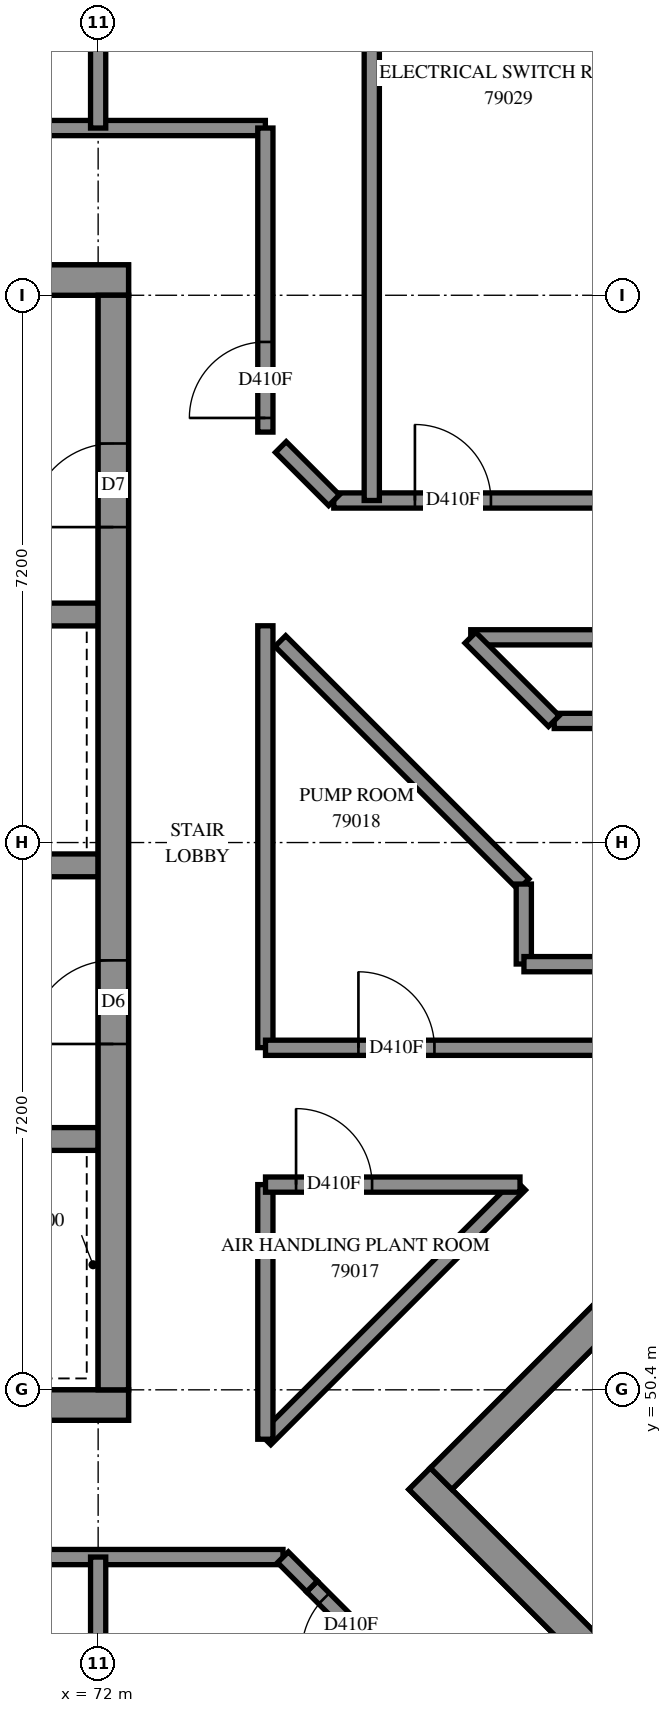
"""IFC4 building model, lengths in metres.
Left out: names, types, materials, properties, quantities, classifications, styles, units other than length and angle.
Written with IfcOpenShell. Run it as: python <this file> out.ifc"""

import sys

from ifc_helpers import new_model, si_unit, direction, frame, frame_2d, origin, place, context, subcontext, project, spatial, polyline, rectangle, outline, extrude, element, fill, save


model = new_model("IFC4")
c1 = context("Model", 3, precision=1e-05, world=origin(), true_north=direction((0.0, 1.0)))
c2 = subcontext(c1, "Body", "Model", "MODEL_VIEW")
j1 = project(units=[si_unit("LENGTHUNIT", "METRE"), si_unit("PLANEANGLEUNIT", "RADIAN")], contexts=[c1])
p1 = place(None, origin())
s1 = spatial("IfcSite", under=j1, at=p1, CompositionType="ELEMENT")
p2 = place(p1, origin())
s2 = spatial("IfcBuilding", under=s1, at=p2, CompositionType="ELEMENT")
p3 = place(p2, frame((0.0, 0.0, 290.6)))
s3 = spatial("IfcBuildingStorey", under=s2, at=p3, CompositionType="ELEMENT", Elevation=290.6)
p4 = place(p3, frame((57.2, 50.2, -0.3), z_axis=(0.0, 0.0, 1.0), x_axis=(1.0, 0.0, 0.0)))
e1 = element("IfcWall", 1, at=p4, inside=s3, PredefinedType="SHEAR", context=c2, shape_type="SweptSolid", body=[
    extrude(rectangle(XDim=15.2, YDim=0.4, at=frame_2d((7.6, 0.0))), origin(), (0.0, 0.0, 1.0), 3.1),
])
p5 = place(p3, frame((57.2, 65.0, -0.3), z_axis=(0.0, 0.0, 1.0), x_axis=(1.0, 0.0, 0.0)))
e2 = element("IfcWall", 2, at=p5, inside=s3, PredefinedType="SHEAR", context=c2, shape_type="SweptSolid", body=[
    extrude(rectangle(XDim=15.2, YDim=0.4, at=frame_2d((7.6, 0.0))), origin(), (0.0, 0.0, 1.0), 3.1),
])
p6 = place(p5, frame((10.4, 0.0, 0.3)))
e3 = element("IfcOpeningElement", 3, at=p6, cuts=e2, PredefinedType="OPENING", context=c2, shape_type="SweptSolid", body=[
    extrude(rectangle(XDim=0.8, YDim=2.1, at=frame_2d((0.4, 1.05))), frame((0.0, 0.21, 0.0), z_axis=(0.0, -1.0, 0.0), x_axis=(1.0, 0.0, 0.0)), (0.0, 0.0, 1.0), 0.42),
])
p7 = place(p3, frame((72.2, 50.4, -0.3), z_axis=(0.0, 0.0, 1.0), x_axis=(0.0, 1.0, 0.0)))
e4 = element("IfcWall", 4, at=p7, inside=s3, PredefinedType="SHEAR", context=c2, shape_type="SweptSolid", body=[
    extrude(rectangle(XDim=14.4, YDim=0.4, at=frame_2d((7.2, 0.0))), origin(), (0.0, 0.0, 1.0), 3.1),
])
p8 = place(p7, frame((4.55, 0.0, 0.3)))
e5 = element("IfcOpeningElement", 5, at=p8, cuts=e4, PredefinedType="OPENING", context=c2, shape_type="SweptSolid", body=[
    extrude(rectangle(XDim=1.1, YDim=2.1, at=frame_2d((0.55, 1.05))), frame((0.0, 0.21, 0.0), z_axis=(0.0, -1.0, 0.0), x_axis=(1.0, 0.0, 0.0)), (0.0, 0.0, 1.0), 0.42),
])
p9 = place(p7, frame((11.35, 0.0, 0.3)))
e6 = element("IfcOpeningElement", 6, at=p9, cuts=e4, PredefinedType="OPENING", context=c2, shape_type="SweptSolid", body=[
    extrude(rectangle(XDim=1.1, YDim=2.1, at=frame_2d((0.55, 1.05))), frame((0.0, 0.21, 0.0), z_axis=(0.0, -1.0, 0.0), x_axis=(1.0, 0.0, 0.0)), (0.0, 0.0, 1.0), 0.42),
])
p10 = place(p3, frame((57.6, 53.7, 0.0), z_axis=(0.0, 0.0, 1.0), x_axis=(1.0, 0.0, 0.0)))
e7 = element("IfcWall", 7, at=p10, inside=s3, PredefinedType="SOLIDWALL", context=c2, shape_type="SweptSolid", body=[
    extrude(rectangle(XDim=14.4, YDim=0.3, at=frame_2d((7.2, 0.0))), origin(), (0.0, 0.0, 1.0), 3.5),
])
p11 = place(p10, frame((12.05, 0.0, 0.0)))
e8 = element("IfcOpeningElement", 8, at=p11, cuts=e7, PredefinedType="OPENING", context=c2, shape_type="SweptSolid", body=[
    extrude(rectangle(XDim=1.1, YDim=2.1, at=frame_2d((0.55, 1.05))), frame((0.0, 0.16, 0.0), z_axis=(0.0, -1.0, 0.0), x_axis=(1.0, 0.0, 0.0)), (0.0, 0.0, 1.0), 0.32),
])
p12 = place(p3, frame((57.6, 57.3, 0.0), z_axis=(0.0, 0.0, 1.0), x_axis=(1.0, 0.0, 0.0)))
e9 = element("IfcWall", 9, at=p12, inside=s3, PredefinedType="SOLIDWALL", context=c2, shape_type="SweptSolid", body=[
    extrude(rectangle(XDim=14.4, YDim=0.3, at=frame_2d((7.2, 0.0))), origin(), (0.0, 0.0, 1.0), 3.5),
])
p13 = place(p12, frame((12.05, 0.0, 0.0)))
e10 = element("IfcOpeningElement", 10, at=p13, cuts=e9, PredefinedType="OPENING", context=c2, shape_type="SweptSolid", body=[
    extrude(rectangle(XDim=1.1, YDim=2.1, at=frame_2d((0.55, 1.05))), frame((0.0, 0.16, 0.0), z_axis=(0.0, -1.0, 0.0), x_axis=(1.0, 0.0, 0.0)), (0.0, 0.0, 1.0), 0.32),
])
p14 = place(p3, frame((64.8, 60.6, 0.0), z_axis=(0.0, 0.0, 1.0), x_axis=(1.0, 0.0, 0.0)))
e11 = element("IfcWall", 11, at=p14, inside=s3, PredefinedType="SOLIDWALL", context=c2, shape_type="SweptSolid", body=[
    extrude(rectangle(XDim=7.2, YDim=0.3, at=frame_2d((3.6, 0.0))), origin(), (0.0, 0.0, 1.0), 3.5),
])
p15 = place(p3, frame((76.23, 49.231, -0.3), z_axis=(0.0, 0.0, 1.0), x_axis=(0.7071034917, -0.7071100706, 0.0)))
e12 = element("IfcWall", 12, at=p15, inside=s3, PredefinedType="SHEAR", context=c2, shape_type="SweptSolid", body=[
    extrude(rectangle(XDim=15.2, YDim=0.4, at=frame_2d((7.6, 0.0))), origin(), (0.0, 0.0, 1.0), 3.1),
])
p16 = place(p3, frame((76.513, 49.231, -0.3), z_axis=(0.0, 0.0, 1.0), x_axis=(0.7071067812, 0.7071067812, 0.0)))
e13 = element("IfcWall", 13, at=p16, inside=s3, PredefinedType="SHEAR", context=c2, shape_type="SweptSolid", body=[
    extrude(rectangle(XDim=14.4, YDim=0.4, at=frame_2d((7.2, 0.0))), origin(), (0.0, 0.0, 1.0), 3.1),
])
p17 = place(p16, frame((4.55, 0.0, 0.3)))
e14 = element("IfcOpeningElement", 14, at=p17, cuts=e13, PredefinedType="OPENING", context=c2, shape_type="SweptSolid", body=[
    extrude(rectangle(XDim=1.1, YDim=2.1, at=frame_2d((0.55, 1.05))), frame((0.0, 0.21, 0.0), z_axis=(0.0, -1.0, 0.0), x_axis=(1.0, 0.0, 0.0)), (0.0, 0.0, 1.0), 0.42),
])
p18 = place(p16, frame((11.35, 0.0, 0.3)))
e15 = element("IfcOpeningElement", 15, at=p18, cuts=e13, PredefinedType="OPENING", context=c2, shape_type="SweptSolid", body=[
    extrude(rectangle(XDim=1.1, YDim=2.1, at=frame_2d((0.55, 1.05))), frame((0.0, 0.21, 0.0), z_axis=(0.0, -1.0, 0.0), x_axis=(1.0, 0.0, 0.0)), (0.0, 0.0, 1.0), 0.42),
])
p19 = place(p3, frame((55.4, 67.0, 0.0), z_axis=(0.0, 0.0, 1.0), x_axis=(1.0, 0.0, 0.0)))
e16 = element("IfcWall", 16, at=p19, inside=s3, PredefinedType="PARTITIONING", context=c2, shape_type="SweptSolid", body=[
    extrude(rectangle(XDim=18.8, YDim=0.2, at=frame_2d((9.4, 0.0))), origin(), (0.0, 0.0, 1.0), 3.5),
])
p20 = place(p19, frame((4.293, 0.0, 0.0)))
e17 = element("IfcOpeningElement", 17, at=p20, cuts=e16, PredefinedType="OPENING", context=c2, shape_type="SweptSolid", body=[
    extrude(rectangle(XDim=1.0, YDim=2.1, at=frame_2d((0.5, 1.05))), frame((0.0, 0.11, 0.0), z_axis=(0.0, -1.0, 0.0), x_axis=(1.0, 0.0, 0.0)), (0.0, 0.0, 1.0), 0.22),
])
p21 = place(p19, frame((6.367, 0.0, 0.0)))
e18 = element("IfcOpeningElement", 18, at=p21, cuts=e16, PredefinedType="OPENING", context=c2, shape_type="SweptSolid", body=[
    extrude(rectangle(XDim=1.0, YDim=2.1, at=frame_2d((0.5, 1.05))), frame((0.0, 0.11, 0.0), z_axis=(0.0, -1.0, 0.0), x_axis=(1.0, 0.0, 0.0)), (0.0, 0.0, 1.0), 0.22),
])
p22 = place(p19, frame((11.492, 0.0, 0.0)))
e19 = element("IfcOpeningElement", 19, at=p22, cuts=e16, PredefinedType="OPENING", context=c2, shape_type="SweptSolid", body=[
    extrude(rectangle(XDim=1.0, YDim=2.1, at=frame_2d((0.5, 1.05))), frame((0.0, 0.11, 0.0), z_axis=(0.0, -1.0, 0.0), x_axis=(1.0, 0.0, 0.0)), (0.0, 0.0, 1.0), 0.22),
])
p23 = place(p19, frame((13.568, 0.0, 0.0)))
e20 = element("IfcOpeningElement", 20, at=p23, cuts=e16, PredefinedType="OPENING", context=c2, shape_type="SweptSolid", body=[
    extrude(rectangle(XDim=1.0, YDim=2.1, at=frame_2d((0.5, 1.05))), frame((0.0, 0.11, 0.0), z_axis=(0.0, -1.0, 0.0), x_axis=(1.0, 0.0, 0.0)), (0.0, 0.0, 1.0), 0.22),
])
p24 = place(p3, frame((56.8, 48.2, 0.0), z_axis=(0.0, 0.0, 1.0), x_axis=(1.0, 0.0, 0.0)))
e21 = element("IfcWall", 21, at=p24, inside=s3, PredefinedType="PARTITIONING", context=c2, shape_type="SweptSolid", body=[
    extrude(rectangle(XDim=17.632, YDim=0.2, at=frame_2d((8.816, 0.0))), origin(), (0.0, 0.0, 1.0), 3.5),
])
p25 = place(p24, frame((4.081, 0.0, 0.0)))
e22 = element("IfcOpeningElement", 22, at=p25, cuts=e21, PredefinedType="OPENING", context=c2, shape_type="SweptSolid", body=[
    extrude(rectangle(XDim=1.0, YDim=2.1, at=frame_2d((0.5, 1.05))), frame((0.0, 0.11, 0.0), z_axis=(0.0, -1.0, 0.0), x_axis=(1.0, 0.0, 0.0)), (0.0, 0.0, 1.0), 0.22),
])
p26 = place(p24, frame((11.886, 0.0, 0.0)))
e23 = element("IfcOpeningElement", 23, at=p26, cuts=e21, PredefinedType="OPENING", context=c2, shape_type="SweptSolid", body=[
    extrude(rectangle(XDim=1.0, YDim=2.1, at=frame_2d((0.5, 1.05))), frame((0.0, 0.11, 0.0), z_axis=(0.0, -1.0, 0.0), x_axis=(1.0, 0.0, 0.0)), (0.0, 0.0, 1.0), 0.22),
])
p27 = place(p3, frame((74.2, 54.902, 0.0), z_axis=(0.0, 0.0, 1.0), x_axis=(0.0, 1.0, 0.0)))
e24 = element("IfcWall", 24, at=p27, inside=s3, PredefinedType="PARTITIONING", context=c2, shape_type="SweptSolid", body=[
    extrude(rectangle(XDim=5.55, YDim=0.2, at=frame_2d((2.775, 0.0))), origin(), (0.0, 0.0, 1.0), 3.5),
])
p28 = place(p3, frame((74.202, 54.9, 0.0), z_axis=(0.0, 0.0, 1.0), x_axis=(1.0, 0.0, 0.0)))
e25 = element("IfcWall", 25, at=p28, inside=s3, PredefinedType="PARTITIONING", context=c2, shape_type="SweptSolid", body=[
    extrude(rectangle(XDim=5.55, YDim=0.2, at=frame_2d((2.775, 0.0))), origin(), (0.0, 0.0, 1.0), 3.5),
])
p29 = place(p28, frame((1.222, 0.0, 0.0)))
e26 = element("IfcOpeningElement", 26, at=p29, cuts=e25, PredefinedType="OPENING", context=c2, shape_type="SweptSolid", body=[
    extrude(rectangle(XDim=1.0, YDim=2.1, at=frame_2d((0.5, 1.05))), frame((0.0, 0.11, 0.0), z_axis=(0.0, -1.0, 0.0), x_axis=(1.0, 0.0, 0.0)), (0.0, 0.0, 1.0), 0.22),
])
p30 = place(p3, frame((74.201, 49.749, 0.0), z_axis=(0.0, 0.0, 1.0), x_axis=(0.7071067812, 0.7071067812, 0.0)))
e27 = element("IfcWall", 27, at=p30, inside=s3, PredefinedType="PARTITIONING", context=c2, shape_type="SweptSolid", body=[
    extrude(rectangle(XDim=4.738, YDim=0.2, at=frame_2d((2.369, 0.0))), origin(), (0.0, 0.0, 1.0), 3.5),
])
p31 = place(p3, frame((72.0, 42.85, 0.0), z_axis=(0.0, 0.0, 1.0), x_axis=(0.0, 1.0, 0.0)))
e28 = element("IfcWall", 28, at=p31, inside=s3, PredefinedType="PARTITIONING", context=c2, shape_type="SweptSolid", body=[
    extrude(rectangle(XDim=5.35, YDim=0.2, at=frame_2d((2.675, 0.0))), origin(), (0.0, 0.0, 1.0), 3.0),
])
p32 = place(p3, frame((72.0, 67.0, 0.0), z_axis=(0.0, 0.0, 1.0), x_axis=(0.0, 1.0, 0.0)))
e29 = element("IfcWall", 29, at=p32, inside=s3, PredefinedType="PARTITIONING", context=c2, shape_type="SweptSolid", body=[
    extrude(rectangle(XDim=5.35, YDim=0.2, at=frame_2d((2.675, 0.0))), origin(), (0.0, 0.0, 1.0), 3.5),
])
p33 = place(p3, frame((74.397, 60.251, 0.0), z_axis=(0.0, 0.0, 1.0), x_axis=(0.7071067812, -0.7071067812, 0.0)))
e30 = element("IfcWall", 30, at=p33, inside=s3, PredefinedType="PARTITIONING", context=c2, shape_type="SweptSolid", body=[
    extrude(rectangle(XDim=4.526, YDim=0.2, at=frame_2d((2.263, 0.0))), origin(), (0.0, 0.0, 1.0), 3.5),
])
p34 = place(p3, frame((77.829, 44.799, 0.0), z_axis=(0.0, 0.0, 1.0), x_axis=(-0.7072005868, 0.7070129631, 0.0)))
e31 = element("IfcWall", 31, at=p34, inside=s3, PredefinedType="PARTITIONING", context=c2, shape_type="SweptSolid", body=[
    extrude(rectangle(XDim=4.264, YDim=0.2, at=frame_2d((2.132, 0.0))), origin(), (0.0, 0.0, 1.0), 3.5),
])
p35 = place(p34, frame((3.04, 0.0, 0.0)))
e32 = element("IfcOpeningElement", 32, at=p35, cuts=e31, PredefinedType="OPENING", context=c2, shape_type="SweptSolid", body=[
    extrude(rectangle(XDim=1.0, YDim=2.1, at=frame_2d((0.5, 1.05))), frame((0.0, 0.11, 0.0), z_axis=(0.0, -1.0, 0.0), x_axis=(1.0, 0.0, 0.0)), (0.0, 0.0, 1.0), 0.22),
])
p36 = place(p3, frame((75.1, 62.1, 0.0), z_axis=(0.0, 0.0, 1.0), x_axis=(1.0, 0.0, 0.0)))
e33 = element("IfcWall", 33, at=p36, inside=s3, PredefinedType="PARTITIONING", context=c2, shape_type="SweptSolid", body=[
    extrude(rectangle(XDim=4.1, YDim=0.2, at=frame_2d((2.05, 0.0))), origin(), (0.0, 0.0, 1.0), 3.5),
])
p37 = place(p36, frame((1.067, 0.0, 0.0)))
e34 = element("IfcOpeningElement", 34, at=p37, cuts=e33, PredefinedType="OPENING", context=c2, shape_type="SweptSolid", body=[
    extrude(rectangle(XDim=1.0, YDim=2.1, at=frame_2d((0.5, 1.05))), frame((0.0, 0.11, 0.0), z_axis=(0.0, -1.0, 0.0), x_axis=(1.0, 0.0, 0.0)), (0.0, 0.0, 1.0), 0.22),
])
p38 = place(p3, frame((74.2, 63.0, 0.0), z_axis=(0.0, 0.0, 1.0), x_axis=(0.0, 1.0, 0.0)))
e35 = element("IfcWall", 35, at=p38, inside=s3, PredefinedType="PARTITIONING", context=c2, shape_type="SweptSolid", body=[
    extrude(rectangle(XDim=4.0, YDim=0.2, at=frame_2d((2.0, 0.0))), origin(), (0.0, 0.0, 1.0), 3.5),
])
p39 = place(p38, frame((0.186, 0.0, 0.0)))
e36 = element("IfcOpeningElement", 36, at=p39, cuts=e35, PredefinedType="OPENING", context=c2, shape_type="SweptSolid", body=[
    extrude(rectangle(XDim=1.0, YDim=2.1, at=frame_2d((0.5, 1.05))), frame((0.0, 0.11, 0.0), z_axis=(0.0, -1.0, 0.0), x_axis=(1.0, 0.0, 0.0)), (0.0, 0.0, 1.0), 0.22),
])
p40 = place(p3, frame((74.2, 49.75, 0.0), z_axis=(0.0, 0.0, 1.0), x_axis=(0.0, 1.0, 0.0)))
e37 = element("IfcWall", 37, at=p40, inside=s3, PredefinedType="PARTITIONING", context=c2, shape_type="SweptSolid", body=[
    extrude(rectangle(XDim=3.35, YDim=0.2, at=frame_2d((1.675, 0.0))), origin(), (0.0, 0.0, 1.0), 3.5),
])
p41 = place(p3, frame((74.202, 53.1, 0.0), z_axis=(0.0, 0.0, 1.0), x_axis=(1.0, 0.0, 0.0)))
e38 = element("IfcWall", 38, at=p41, inside=s3, PredefinedType="PARTITIONING", context=c2, shape_type="SweptSolid", body=[
    extrude(rectangle(XDim=3.348, YDim=0.2, at=frame_2d((1.674, 0.0))), origin(), (0.0, 0.0, 1.0), 3.5),
])
p42 = place(p41, frame((0.402, 0.0, 0.0)))
e39 = element("IfcOpeningElement", 39, at=p42, cuts=e38, PredefinedType="OPENING", context=c2, shape_type="SweptSolid", body=[
    extrude(rectangle(XDim=1.0, YDim=2.1, at=frame_2d((0.5, 1.05))), frame((0.0, 0.11, 0.0), z_axis=(0.0, -1.0, 0.0), x_axis=(1.0, 0.0, 0.0)), (0.0, 0.0, 1.0), 0.22),
])
p43 = place(p3, frame((76.902, 60.3, 0.0), z_axis=(0.0, 0.0, 1.0), x_axis=(1.0, 0.0, 0.0)))
e40 = element("IfcWall", 40, at=p43, inside=s3, PredefinedType="PARTITIONING", context=c2, shape_type="SweptSolid", body=[
    extrude(rectangle(XDim=2.298, YDim=0.2, at=frame_2d((1.149, 0.0))), origin(), (0.0, 0.0, 1.0), 3.5),
])
p44 = place(p3, frame((78.0, 59.2, 0.0), z_axis=(0.0, 0.0, 1.0), x_axis=(1.0, 0.0, 0.0)))
e41 = element("IfcWall", 41, at=p44, inside=s3, PredefinedType="PARTITIONING", context=c2, shape_type="SweptSolid", body=[
    extrude(rectangle(XDim=1.8, YDim=0.2, at=frame_2d((0.9, 0.0))), origin(), (0.0, 0.0, 1.0), 3.5),
])
p45 = place(p3, frame((76.897, 60.295, 0.0), z_axis=(0.0, 0.0, 1.0), x_axis=(0.7071067812, -0.7071067812, 0.0)))
e42 = element("IfcWall", 42, at=p45, inside=s3, PredefinedType="PARTITIONING", context=c2, shape_type="SweptSolid", body=[
    extrude(rectangle(XDim=1.553, YDim=0.2, at=frame_2d((0.776, 0.0))), origin(), (0.0, 0.0, 1.0), 3.5),
])
for number, where, z_axis, x_axis in (
    (43, (77.6, 56.002, 0.0), (0.0, 0.0, 1.0), (0.0, 1.0, 0.0)),
    (44, (77.602, 56.0, 0.0), (0.0, 0.0, 1.0), (1.0, 0.0, 0.0)),
):
    element("IfcWall", number, at=place(p3, frame(where, z_axis=z_axis, x_axis=x_axis)), inside=s3, PredefinedType="PARTITIONING", context=c2, shape_type="SweptSolid", body=[
        extrude(rectangle(XDim=1.052, YDim=0.2, at=frame_2d((0.526, 0.0))), origin(), (0.0, 0.0, 1.0), 3.5),
    ])
p46 = place(p3, frame((74.403, 62.803, 0.0), z_axis=(0.0, 0.0, 1.0), x_axis=(0.7071067812, -0.7071067812, 0.0)))
e45 = element("IfcWall", 45, at=p46, inside=s3, PredefinedType="PARTITIONING", context=c2, shape_type="SweptSolid", body=[
    extrude(rectangle(XDim=0.99, YDim=0.2, at=frame_2d((0.495, 0.0))), origin(), (0.0, 0.0, 1.0), 3.5),
])
p47 = place(p3, frame((74.431, 48.198, 0.0), z_axis=(0.0, 0.0, 1.0), x_axis=(0.7052581455, -0.7089505965, 0.0)))
e46 = element("IfcWall", 46, at=p47, inside=s3, PredefinedType="PARTITIONING", context=c2, shape_type="SweptSolid", body=[
    extrude(rectangle(XDim=0.542, YDim=0.2, at=frame_2d((0.271, 0.0))), origin(), (0.0, 0.0, 1.0), 3.5),
])
p48 = place(p3, frame((75.6, 62.1, 0.0), z_axis=(0.0, 0.0, 1.0), x_axis=(0.0, 1.0, 0.0)))
e47 = element("IfcWall", 47, at=p48, inside=s3, PredefinedType="PARTITIONING", context=c2, shape_type="SweptSolid", body=[
    extrude(outline(polyline([(0.0, -0.1), (10.7, -0.1), (10.7, 0.1), (0.0, 0.1), (0.0, -0.1)])), origin(), (0.0, 0.0, 1.0), 3.5),
])
p49 = place(p8, origin())
e48 = element("IfcDoor", 48, at=p49, inside=s3, OperationType="DOUBLE_DOOR_SINGLE_SWING", PredefinedType="DOOR", context=c2, shape_type="SweptSolid", body=[
    extrude(rectangle(XDim=1.1, YDim=2.1, at=frame_2d((0.55, 1.05))), frame((0.0, 0.025, 0.0), z_axis=(0.0, -1.0, 0.0), x_axis=(1.0, 0.0, 0.0)), (0.0, 0.0, 1.0), 0.05),
])
fill(e5, e48)
p50 = place(p9, origin())
e49 = element("IfcDoor", 49, at=p50, inside=s3, OperationType="SINGLE_SWING_RIGHT", PredefinedType="DOOR", context=c2, shape_type="SweptSolid", body=[
    extrude(rectangle(XDim=1.1, YDim=2.1, at=frame_2d((0.55, 1.05))), frame((0.0, 0.025, 0.0), z_axis=(0.0, -1.0, 0.0), x_axis=(1.0, 0.0, 0.0)), (0.0, 0.0, 1.0), 0.05),
])
fill(e6, e49)
p51 = place(p35, origin())
e50 = element("IfcDoor", 50, at=p51, inside=s3, OperationType="SINGLE_SWING_LEFT", PredefinedType="DOOR", context=c2, shape_type="SweptSolid", body=[
    extrude(rectangle(XDim=1.0, YDim=2.1, at=frame_2d((0.5, 1.05))), frame((0.0, 0.025, 0.0), z_axis=(0.0, -1.0, 0.0), x_axis=(1.0, 0.0, 0.0)), (0.0, 0.0, 1.0), 0.05),
])
fill(e32, e50)
p52 = place(p42, origin())
e51 = element("IfcDoor", 51, at=p52, inside=s3, OperationType="SINGLE_SWING_RIGHT", PredefinedType="DOOR", context=c2, shape_type="SweptSolid", body=[
    extrude(rectangle(XDim=1.0, YDim=2.1, at=frame_2d((0.5, 1.05))), frame((0.0, 0.025, 0.0), z_axis=(0.0, -1.0, 0.0), x_axis=(1.0, 0.0, 0.0)), (0.0, 0.0, 1.0), 0.05),
])
fill(e39, e51)
p53 = place(p29, origin())
e52 = element("IfcDoor", 52, at=p53, inside=s3, OperationType="SINGLE_SWING_LEFT", PredefinedType="DOOR", context=c2, shape_type="SweptSolid", body=[
    extrude(rectangle(XDim=1.0, YDim=2.1, at=frame_2d((0.5, 1.05))), frame((0.0, 0.025, 0.0), z_axis=(0.0, -1.0, 0.0), x_axis=(1.0, 0.0, 0.0)), (0.0, 0.0, 1.0), 0.05),
])
fill(e26, e52)
p54 = place(p39, origin())
e53 = element("IfcDoor", 53, at=p54, inside=s3, OperationType="SINGLE_SWING_RIGHT", PredefinedType="DOOR", context=c2, shape_type="SweptSolid", body=[
    extrude(rectangle(XDim=1.0, YDim=2.1, at=frame_2d((0.5, 1.05))), frame((0.0, 0.025, 0.0), z_axis=(0.0, -1.0, 0.0), x_axis=(1.0, 0.0, 0.0)), (0.0, 0.0, 1.0), 0.05),
])
fill(e36, e53)
p55 = place(p37, origin())
e54 = element("IfcDoor", 54, at=p55, inside=s3, OperationType="SINGLE_SWING_LEFT", PredefinedType="DOOR", context=c2, shape_type="SweptSolid", body=[
    extrude(rectangle(XDim=1.0, YDim=2.1, at=frame_2d((0.5, 1.05))), frame((0.0, 0.025, 0.0), z_axis=(0.0, -1.0, 0.0), x_axis=(1.0, 0.0, 0.0)), (0.0, 0.0, 1.0), 0.05),
])
fill(e34, e54)
save(model, sys.argv[1])
